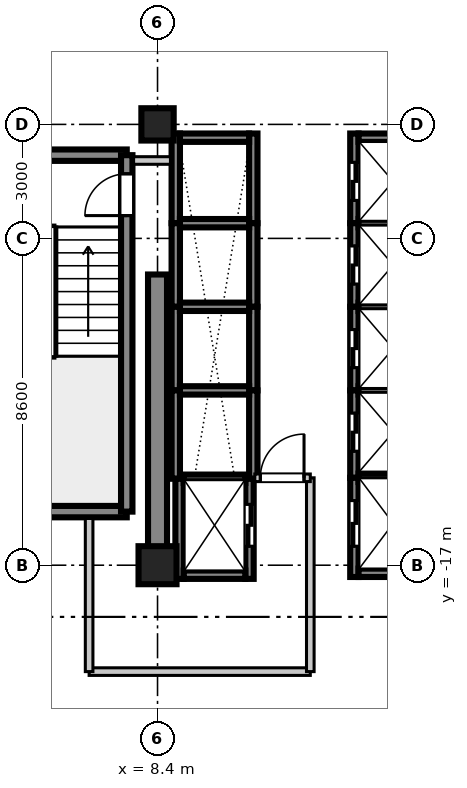
"""IFC4 building model, lengths in metres.
Left out: names, types, materials, properties, quantities, classifications, styles, units other than length and angle.
Written with IfcOpenShell. Run it as: python <this file> out.ifc"""

import sys

from ifc_helpers import new_model, si_unit, direction, frame, frame_2d, origin, origin_2d, place, context, subcontext, project, spatial, rectangle, extrude, source, transform, mapped, element, fill, save


model = new_model("IFC4")
c1 = context("Model", 3, precision=1e-05, world=origin(), true_north=direction((0.0, 1.0)))
c2 = subcontext(c1, "Body", "Model", "MODEL_VIEW")
j1 = project(units=[si_unit("LENGTHUNIT", "METRE"), si_unit("PLANEANGLEUNIT", "RADIAN")], contexts=[c1])
p1 = place(None, origin())
s1 = spatial("IfcSite", under=j1, at=p1, CompositionType="ELEMENT")
p2 = place(p1, origin())
s2 = spatial("IfcBuilding", under=s1, at=p2, CompositionType="ELEMENT")
p3 = place(p2, frame((0.0, 0.0, 219.7)))
s3 = spatial("IfcBuildingStorey", under=s2, at=p3, CompositionType="ELEMENT", Elevation=219.7)
m1 = source(origin(), c2, "Body", "SweptSolid", [
    extrude(rectangle(XDim=1.0, YDim=1.0, at=origin_2d()), origin(), (0.0, 0.0, 1.0), 3.655),
])
p4 = place(p3, frame((8.4, -17.0, 0.0), z_axis=(0.0, 0.0, 1.0), x_axis=(1.0, 0.0, 0.0)))
e1 = element("IfcColumn", 1, at=p4, inside=s3, PredefinedType="COLUMN", context=c2, shape_type="MappedRepresentation", body=[
    mapped(m1, transform((0.0, 0.0, 0.0), scale=1.0)),
])
m2 = source(origin(), c2, "Body", "SweptSolid", [
    extrude(rectangle(XDim=0.85, YDim=0.85, at=origin_2d()), origin(), (0.0, 0.0, 1.0), 3.655),
])
p5 = place(p3, frame((8.4, -5.4, 0.0), z_axis=(0.0, 0.0, 1.0), x_axis=(1.0, 0.0, 0.0)))
e2 = element("IfcColumn", 2, at=p5, inside=s3, PredefinedType="PILASTER", context=c2, shape_type="MappedRepresentation", body=[
    mapped(m2, transform((0.0, 0.0, 0.0), scale=1.0)),
])
m3 = source(origin(), c2, "Body", "SweptSolid", [
    extrude(rectangle(XDim=7.65, YDim=0.5, at=frame_2d((3.825, 0.0))), origin(), (0.0, 0.0, 1.0), 3.41),
])
p6 = place(p3, frame((8.4, -17.0, 0.0), z_axis=(0.0, 0.0, 1.0), x_axis=(0.0, 1.0, 0.0)))
e3 = element("IfcWall", 3, at=p6, inside=s3, PredefinedType="SHEAR", context=c2, shape_type="MappedRepresentation", body=[
    mapped(m3, transform((0.0, 0.0, 0.0), scale=1.0)),
])
m4 = source(origin(), c2, "Body", "SweptSolid", [
    extrude(rectangle(XDim=3.98, YDim=0.3, at=frame_2d((1.99, 0.0))), origin(), (0.0, 0.0, 1.0), 3.41),
])
for number, where, z_axis, x_axis in (
    (4, (3.61, -15.59, 0.0), (0.0, 0.0, 1.0), (1.0, 0.0, 0.0)),
    (5, (3.61, -6.21, 0.0), (0.0, 0.0, 1.0), (1.0, 0.0, 0.0)),
):
    element("IfcWall", number, at=place(p3, frame(where, z_axis=z_axis, x_axis=x_axis)), inside=s3, PredefinedType="SHEAR", context=c2, shape_type="MappedRepresentation", body=[
        mapped(m4, transform((0.0, 0.0, 0.0), scale=1.0)),
    ])
m5 = source(origin(), c2, "Body", "SweptSolid", [
    extrude(rectangle(XDim=9.38, YDim=0.3, at=frame_2d((4.69, 0.0))), origin(), (0.0, 0.0, 1.0), 3.41),
])
p7 = place(p3, frame((7.59, -15.59, 0.0), z_axis=(0.0, 0.0, 1.0), x_axis=(0.0, 1.0, 0.0)))
e6 = element("IfcWall", 6, at=p7, inside=s3, PredefinedType="SHEAR", context=c2, shape_type="MappedRepresentation", body=[
    mapped(m5, transform((0.0, 0.0, 0.0), scale=1.0)),
])
p8 = place(p7, frame((7.79, 0.0, 0.0)))
e7 = element("IfcOpeningElement", 7, at=p8, cuts=e6, PredefinedType="OPENING", context=c2, shape_type="SweptSolid", body=[
    extrude(rectangle(XDim=1.1, YDim=2.15, at=frame_2d((0.55, 1.075))), frame((0.0, 0.16, 0.0), z_axis=(0.0, -1.0, 0.0), x_axis=(1.0, 0.0, 0.0)), (0.0, 0.0, 1.0), 0.32),
])
m6 = source(origin(), c2, "Body", "SweptSolid", [
    extrude(rectangle(XDim=2.36, YDim=0.22, at=frame_2d((1.18, 0.0))), origin(), (0.0, 0.0, 1.0), 3.41),
])
p9 = place(p3, frame((13.58, -8.0, 0.0), z_axis=(0.0, 0.0, 1.0), x_axis=(0.0, 1.0, 0.0)))
e8 = element("IfcWall", 8, at=p9, inside=s3, PredefinedType="SHEAR", context=c2, shape_type="MappedRepresentation", body=[
    mapped(m6, transform((0.0, 0.0, 0.0), scale=1.0)),
])
p10 = place(p9, frame((0.6, 0.0, 0.0)))
e9 = element("IfcOpeningElement", 9, at=p10, cuts=e8, PredefinedType="OPENING", context=c2, shape_type="SweptSolid", body=[
    extrude(rectangle(XDim=1.0, YDim=2.2, at=frame_2d((0.5, 1.1))), frame((0.0, 0.12, 0.0), z_axis=(0.0, -1.0, 0.0), x_axis=(1.0, 0.0, 0.0)), (0.0, 0.0, 1.0), 0.24),
])
m7 = source(origin(), c2, "Body", "SweptSolid", [
    extrude(rectangle(XDim=1.82, YDim=0.22, at=frame_2d((0.91, 0.0))), origin(), (0.0, 0.0, 1.0), 3.41),
])
p11 = place(p3, frame((13.69, -5.75, 0.0), z_axis=(0.0, 0.0, 1.0), x_axis=(1.0, 0.0, 0.0)))
e10 = element("IfcWall", 10, at=p11, inside=s3, PredefinedType="SHEAR", context=c2, shape_type="MappedRepresentation", body=[
    mapped(m7, transform((0.0, 0.0, 0.0), scale=1.0)),
])
m8 = source(origin(), c2, "Body", "SweptSolid", [
    extrude(rectangle(XDim=2.2, YDim=0.22, at=frame_2d((1.1, 0.0))), origin(), (0.0, 0.0, 1.0), 3.41),
])
p12 = place(p3, frame((13.58, -10.2, 0.0), z_axis=(0.0, 0.0, 1.0), x_axis=(0.0, 1.0, 0.0)))
e11 = element("IfcWall", 11, at=p12, inside=s3, PredefinedType="SHEAR", context=c2, shape_type="MappedRepresentation", body=[
    mapped(m8, transform((0.0, 0.0, 0.0), scale=1.0)),
])
p13 = place(p12, frame((0.6, 0.0, 0.0)))
e12 = element("IfcOpeningElement", 12, at=p13, cuts=e11, PredefinedType="OPENING", context=c2, shape_type="SweptSolid", body=[
    extrude(rectangle(XDim=1.0, YDim=2.2, at=frame_2d((0.5, 1.1))), frame((0.0, 0.12, 0.0), z_axis=(0.0, -1.0, 0.0), x_axis=(1.0, 0.0, 0.0)), (0.0, 0.0, 1.0), 0.24),
])
m9 = source(origin(), c2, "Body", "SweptSolid", [
    extrude(rectangle(XDim=1.82, YDim=0.22, at=frame_2d((0.91, 0.0))), origin(), (0.0, 0.0, 1.0), 3.7),
])
p14 = place(p3, frame((13.69, -8.0, 0.0), z_axis=(0.0, 0.0, 1.0), x_axis=(1.0, 0.0, 0.0)))
e13 = element("IfcWall", 13, at=p14, inside=s3, PredefinedType="SHEAR", context=c2, shape_type="MappedRepresentation", body=[
    mapped(m9, transform((0.0, 0.0, 0.0), scale=1.0)),
])
p15 = place(p3, frame((13.58, -12.4, 0.0), z_axis=(0.0, 0.0, 1.0), x_axis=(0.0, 1.0, 0.0)))
e14 = element("IfcWall", 14, at=p15, inside=s3, PredefinedType="SHEAR", context=c2, shape_type="MappedRepresentation", body=[
    mapped(m8, transform((0.0, 0.0, 0.0), scale=1.0)),
])
p16 = place(p15, frame((0.6, 0.0, 0.0)))
e15 = element("IfcOpeningElement", 15, at=p16, cuts=e14, PredefinedType="OPENING", context=c2, shape_type="SweptSolid", body=[
    extrude(rectangle(XDim=1.0, YDim=2.2, at=frame_2d((0.5, 1.1))), frame((0.0, 0.12, 0.0), z_axis=(0.0, -1.0, 0.0), x_axis=(1.0, 0.0, 0.0)), (0.0, 0.0, 1.0), 0.24),
])
p17 = place(p3, frame((13.69, -10.2, 0.0), z_axis=(0.0, 0.0, 1.0), x_axis=(1.0, 0.0, 0.0)))
e16 = element("IfcWall", 16, at=p17, inside=s3, PredefinedType="SHEAR", context=c2, shape_type="MappedRepresentation", body=[
    mapped(m9, transform((0.0, 0.0, 0.0), scale=1.0)),
])
m10 = source(origin(), c2, "Body", "SweptSolid", [
    extrude(rectangle(XDim=2.3, YDim=0.22, at=frame_2d((1.15, 0.0))), origin(), (0.0, 0.0, 1.0), 3.41),
])
p18 = place(p3, frame((13.58, -14.7, 0.0), z_axis=(0.0, 0.0, 1.0), x_axis=(0.0, 1.0, 0.0)))
e17 = element("IfcWall", 17, at=p18, inside=s3, PredefinedType="SHEAR", context=c2, shape_type="MappedRepresentation", body=[
    mapped(m10, transform((0.0, 0.0, 0.0), scale=1.0)),
])
p19 = place(p18, frame((0.7, 0.0, 0.0)))
e18 = element("IfcOpeningElement", 18, at=p19, cuts=e17, PredefinedType="OPENING", context=c2, shape_type="SweptSolid", body=[
    extrude(rectangle(XDim=1.0, YDim=2.2, at=frame_2d((0.5, 1.1))), frame((0.0, 0.12, 0.0), z_axis=(0.0, -1.0, 0.0), x_axis=(1.0, 0.0, 0.0)), (0.0, 0.0, 1.0), 0.24),
])
p20 = place(p3, frame((13.69, -12.4, 0.0), z_axis=(0.0, 0.0, 1.0), x_axis=(1.0, 0.0, 0.0)))
e19 = element("IfcWall", 19, at=p20, inside=s3, PredefinedType="SHEAR", context=c2, shape_type="MappedRepresentation", body=[
    mapped(m9, transform((0.0, 0.0, 0.0), scale=1.0)),
])
for number, where, z_axis, x_axis in (
    (20, (8.88, -8.0, 0.0), (0.0, 0.0, 1.0), (0.0, 1.0, 0.0)),
    (21, (10.92, -8.0, 0.0), (0.0, 0.0, 1.0), (0.0, 1.0, 0.0)),
):
    element("IfcWall", number, at=place(p3, frame(where, z_axis=z_axis, x_axis=x_axis)), inside=s3, PredefinedType="SHEAR", context=c2, shape_type="MappedRepresentation", body=[
        mapped(m6, transform((0.0, 0.0, 0.0), scale=1.0)),
    ])
p21 = place(p3, frame((8.99, -5.75, 0.0), z_axis=(0.0, 0.0, 1.0), x_axis=(1.0, 0.0, 0.0)))
e22 = element("IfcWall", 22, at=p21, inside=s3, PredefinedType="SHEAR", context=c2, shape_type="MappedRepresentation", body=[
    mapped(m7, transform((0.0, 0.0, 0.0), scale=1.0)),
])
for number, where, z_axis, x_axis in (
    (23, (8.88, -10.2, 0.0), (0.0, 0.0, 1.0), (0.0, 1.0, 0.0)),
    (24, (10.92, -10.2, 0.0), (0.0, 0.0, 1.0), (0.0, 1.0, 0.0)),
):
    element("IfcWall", number, at=place(p3, frame(where, z_axis=z_axis, x_axis=x_axis)), inside=s3, PredefinedType="SHEAR", context=c2, shape_type="MappedRepresentation", body=[
        mapped(m8, transform((0.0, 0.0, 0.0), scale=1.0)),
    ])
p22 = place(p3, frame((8.99, -8.0, 0.0), z_axis=(0.0, 0.0, 1.0), x_axis=(1.0, 0.0, 0.0)))
e25 = element("IfcWall", 25, at=p22, inside=s3, PredefinedType="SHEAR", context=c2, shape_type="MappedRepresentation", body=[
    mapped(m9, transform((0.0, 0.0, 0.0), scale=1.0)),
])
for number, where, z_axis, x_axis in (
    (26, (8.88, -12.4, 0.0), (0.0, 0.0, 1.0), (0.0, 1.0, 0.0)),
    (27, (10.92, -12.4, 0.0), (0.0, 0.0, 1.0), (0.0, 1.0, 0.0)),
):
    element("IfcWall", number, at=place(p3, frame(where, z_axis=z_axis, x_axis=x_axis)), inside=s3, PredefinedType="SHEAR", context=c2, shape_type="MappedRepresentation", body=[
        mapped(m8, transform((0.0, 0.0, 0.0), scale=1.0)),
    ])
p23 = place(p3, frame((8.99, -10.2, 0.0), z_axis=(0.0, 0.0, 1.0), x_axis=(1.0, 0.0, 0.0)))
e28 = element("IfcWall", 28, at=p23, inside=s3, PredefinedType="SHEAR", context=c2, shape_type="MappedRepresentation", body=[
    mapped(m9, transform((0.0, 0.0, 0.0), scale=1.0)),
])
m11 = source(origin(), c2, "Body", "SweptSolid", [
    extrude(rectangle(XDim=2.325, YDim=0.22, at=frame_2d((1.163, 0.0))), origin(), (0.0, 0.0, 1.0), 3.41),
])
for number, where, z_axis, x_axis in (
    (29, (8.88, -14.725, 0.0), (0.0, 0.0, 1.0), (0.0, 1.0, 0.0)),
    (30, (10.92, -14.725, 0.0), (0.0, 0.0, 1.0), (0.0, 1.0, 0.0)),
):
    element("IfcWall", number, at=place(p3, frame(where, z_axis=z_axis, x_axis=x_axis)), inside=s3, PredefinedType="SHEAR", context=c2, shape_type="MappedRepresentation", body=[
        mapped(m11, transform((0.0, 0.0, 0.0), scale=1.0)),
    ])
p24 = place(p3, frame((8.99, -12.4, 0.0), z_axis=(0.0, 0.0, 1.0), x_axis=(1.0, 0.0, 0.0)))
e31 = element("IfcWall", 31, at=p24, inside=s3, PredefinedType="SHEAR", context=c2, shape_type="MappedRepresentation", body=[
    mapped(m9, transform((0.0, 0.0, 0.0), scale=1.0)),
])
m12 = source(origin(), c2, "Body", "SweptSolid", [
    extrude(rectangle(XDim=2.635, YDim=0.22, at=frame_2d((1.317, 0.0))), origin(), (0.0, 0.0, 1.0), 3.41),
])
p25 = place(p3, frame((8.98, -17.36, 0.0), z_axis=(0.0, 0.0, 1.0), x_axis=(0.0, 1.0, 0.0)))
e32 = element("IfcWall", 32, at=p25, inside=s3, PredefinedType="SHEAR", context=c2, shape_type="MappedRepresentation", body=[
    mapped(m12, transform((0.0, 0.0, 0.0), scale=1.0)),
])
p26 = place(p3, frame((10.82, -17.36, 0.0), z_axis=(0.0, 0.0, 1.0), x_axis=(0.0, 1.0, 0.0)))
e33 = element("IfcWall", 33, at=p26, inside=s3, PredefinedType="SHEAR", context=c2, shape_type="MappedRepresentation", body=[
    mapped(m12, transform((0.0, 0.0, 0.0), scale=1.0)),
])
p27 = place(p26, frame((0.86, 0.0, 0.0)))
e34 = element("IfcOpeningElement", 34, at=p27, cuts=e33, PredefinedType="OPENING", context=c2, shape_type="SweptSolid", body=[
    extrude(rectangle(XDim=1.1, YDim=2.2, at=frame_2d((0.55, 1.1))), frame((0.0, 0.12, 0.0), z_axis=(0.0, -1.0, 0.0), x_axis=(1.0, 0.0, 0.0)), (0.0, 0.0, 1.0), 0.24),
])
m13 = source(origin(), c2, "Body", "SweptSolid", [
    extrude(rectangle(XDim=1.62, YDim=0.22, at=frame_2d((0.81, 0.0))), origin(), (0.0, 0.0, 1.0), 3.41),
])
p28 = place(p3, frame((9.09, -17.25, 0.0), z_axis=(0.0, 0.0, 1.0), x_axis=(1.0, 0.0, 0.0)))
e35 = element("IfcWall", 35, at=p28, inside=s3, PredefinedType="SHEAR", context=c2, shape_type="MappedRepresentation", body=[
    mapped(m13, transform((0.0, 0.0, 0.0), scale=1.0)),
])
m14 = source(origin(), c2, "Body", "SweptSolid", [
    extrude(rectangle(XDim=1.62, YDim=0.22, at=frame_2d((0.81, 0.0))), origin(), (0.0, 0.0, 1.0), 3.7),
])
p29 = place(p3, frame((9.09, -14.725, 0.0), z_axis=(0.0, 0.0, 1.0), x_axis=(1.0, 0.0, 0.0)))
e36 = element("IfcWall", 36, at=p29, inside=s3, PredefinedType="SHEAR", context=c2, shape_type="MappedRepresentation", body=[
    mapped(m14, transform((0.0, 0.0, 0.0), scale=1.0)),
])
m15 = source(origin(), c2, "Body", "SweptSolid", [
    extrude(rectangle(XDim=2.61, YDim=0.22, at=frame_2d((1.305, 0.0))), origin(), (0.0, 0.0, 1.0), 3.41),
])
p30 = place(p3, frame((13.58, -17.31, 0.0), z_axis=(0.0, 0.0, 1.0), x_axis=(0.0, 1.0, 0.0)))
e37 = element("IfcWall", 37, at=p30, inside=s3, PredefinedType="SHEAR", context=c2, shape_type="MappedRepresentation", body=[
    mapped(m15, transform((0.0, 0.0, 0.0), scale=1.0)),
])
p31 = place(p30, frame((0.81, 0.0, 0.0)))
e38 = element("IfcOpeningElement", 38, at=p31, cuts=e37, PredefinedType="OPENING", context=c2, shape_type="SweptSolid", body=[
    extrude(rectangle(XDim=1.2, YDim=2.2, at=frame_2d((0.6, 1.1))), frame((0.0, 0.12, 0.0), z_axis=(0.0, -1.0, 0.0), x_axis=(1.0, 0.0, 0.0)), (0.0, 0.0, 1.0), 0.24),
])
p32 = place(p3, frame((13.69, -17.2, 0.0), z_axis=(0.0, 0.0, 1.0), x_axis=(1.0, 0.0, 0.0)))
e39 = element("IfcWall", 39, at=p32, inside=s3, PredefinedType="SHEAR", context=c2, shape_type="MappedRepresentation", body=[
    mapped(m7, transform((0.0, 0.0, 0.0), scale=1.0)),
])
p33 = place(p3, frame((13.69, -14.7, 0.0), z_axis=(0.0, 0.0, 1.0), x_axis=(1.0, 0.0, 0.0)))
e40 = element("IfcWall", 40, at=p33, inside=s3, PredefinedType="SHEAR", context=c2, shape_type="MappedRepresentation", body=[
    mapped(m9, transform((0.0, 0.0, 0.0), scale=1.0)),
])
m16 = source(origin(), c2, "Body", "SweptSolid", [
    extrude(rectangle(XDim=5.82, YDim=0.2, at=frame_2d((2.91, 0.0))), origin(), (0.0, 0.0, 1.0), 2.75),
])
p34 = place(p3, frame((6.6, -19.8, 0.0), z_axis=(0.0, 0.0, 1.0), x_axis=(1.0, 0.0, 0.0)))
e41 = element("IfcWall", 41, at=p34, inside=s3, PredefinedType="PARTITIONING", context=c2, shape_type="MappedRepresentation", body=[
    mapped(m16, transform((0.0, 0.0, 0.0), scale=1.0)),
])
m17 = source(origin(), c2, "Body", "SweptSolid", [
    extrude(rectangle(XDim=4.03, YDim=0.2, at=frame_2d((2.015, 0.0))), origin(), (0.0, 0.0, 1.0), 2.75),
])
p35 = place(p3, frame((6.6, -19.8, 0.0), z_axis=(0.0, 0.0, 1.0), x_axis=(0.0, 1.0, 0.0)))
e42 = element("IfcWall", 42, at=p35, inside=s3, PredefinedType="PARTITIONING", context=c2, shape_type="MappedRepresentation", body=[
    mapped(m17, transform((0.0, 0.0, 0.0), scale=1.0)),
])
m18 = source(origin(), c2, "Body", "SweptSolid", [
    extrude(rectangle(XDim=5.1, YDim=0.2, at=frame_2d((2.55, 0.0))), origin(), (0.0, 0.0, 1.0), 2.75),
])
p36 = place(p3, frame((12.42, -19.8, 0.0), z_axis=(0.0, 0.0, 1.0), x_axis=(0.0, 1.0, 0.0)))
e43 = element("IfcWall", 43, at=p36, inside=s3, PredefinedType="PARTITIONING", context=c2, shape_type="MappedRepresentation", body=[
    mapped(m18, transform((0.0, 0.0, 0.0), scale=1.0)),
])
m19 = source(origin(), c2, "Body", "SweptSolid", [
    extrude(rectangle(XDim=1.46, YDim=0.2, at=frame_2d((0.73, 0.0))), origin(), (0.0, 0.0, 1.0), 2.75),
])
p37 = place(p3, frame((10.96, -14.7, 0.0), z_axis=(0.0, 0.0, 1.0), x_axis=(1.0, 0.0, 0.0)))
e44 = element("IfcWall", 44, at=p37, inside=s3, PredefinedType="PARTITIONING", context=c2, shape_type="MappedRepresentation", body=[
    mapped(m19, transform((0.0, 0.0, 0.0), scale=1.0)),
])
p38 = place(p37, frame((0.145, 0.0, 0.0)))
e45 = element("IfcOpeningElement", 45, at=p38, cuts=e44, PredefinedType="OPENING", context=c2, shape_type="SweptSolid", body=[
    extrude(rectangle(XDim=1.15, YDim=2.15, at=frame_2d((0.575, 1.075))), frame((0.0, 0.11, 0.0), z_axis=(0.0, -1.0, 0.0), x_axis=(1.0, 0.0, 0.0)), (0.0, 0.0, 1.0), 0.22),
])
m20 = source(origin(), c2, "Body", "SweptSolid", [
    extrude(rectangle(XDim=0.97, YDim=0.2, at=frame_2d((0.485, 0.0))), origin(), (0.0, 0.0, 1.0), 2.75),
])
p39 = place(p3, frame((7.77, -6.35, 0.0), z_axis=(0.0, 0.0, 1.0), x_axis=(1.0, 0.0, 0.0)))
e46 = element("IfcWall", 46, at=p39, inside=s3, PredefinedType="PARTITIONING", context=c2, shape_type="MappedRepresentation", body=[
    mapped(m20, transform((0.0, 0.0, 0.0), scale=1.0)),
])
m21 = source(origin(), c2, "Body", "SweptSolid", [
    extrude(rectangle(XDim=1.1, YDim=2.15, at=frame_2d((0.55, 1.075))), frame((0.0, 0.025, 0.0), z_axis=(0.0, -1.0, 0.0), x_axis=(1.0, 0.0, 0.0)), (0.0, 0.0, 1.0), 0.05),
])
p40 = place(p8, origin())
e47 = element("IfcDoor", 47, at=p40, inside=s3, OperationType="SINGLE_SWING_LEFT", PredefinedType="DOOR", context=c2, shape_type="MappedRepresentation", body=[
    mapped(m21, transform((0.0, 0.0, 0.0), scale=1.0)),
])
fill(e7, e47)
m22 = source(origin(), c2, "Body", "SweptSolid", [
    extrude(rectangle(XDim=1.0, YDim=2.2, at=frame_2d((0.5, 1.1))), frame((0.0, 0.025, 0.0), z_axis=(0.0, -1.0, 0.0), x_axis=(1.0, 0.0, 0.0)), (0.0, 0.0, 1.0), 0.05),
])
p41 = place(p10, origin())
e48 = element("IfcDoor", 48, at=p41, inside=s3, OperationType="DOUBLE_DOOR_SLIDING", PredefinedType="DOOR", context=c2, shape_type="MappedRepresentation", body=[
    mapped(m22, transform((0.0, 0.0, 0.0), scale=1.0)),
])
fill(e9, e48)
p42 = place(p13, origin())
e49 = element("IfcDoor", 49, at=p42, inside=s3, OperationType="DOUBLE_DOOR_SLIDING", PredefinedType="DOOR", context=c2, shape_type="MappedRepresentation", body=[
    mapped(m22, transform((0.0, 0.0, 0.0), scale=1.0)),
])
fill(e12, e49)
p43 = place(p16, origin())
e50 = element("IfcDoor", 50, at=p43, inside=s3, OperationType="DOUBLE_DOOR_SLIDING", PredefinedType="DOOR", context=c2, shape_type="MappedRepresentation", body=[
    mapped(m22, transform((0.0, 0.0, 0.0), scale=1.0)),
])
fill(e15, e50)
p44 = place(p19, origin())
e51 = element("IfcDoor", 51, at=p44, inside=s3, OperationType="DOUBLE_DOOR_SLIDING", PredefinedType="DOOR", context=c2, shape_type="MappedRepresentation", body=[
    mapped(m22, transform((0.0, 0.0, 0.0), scale=1.0)),
])
fill(e18, e51)
m23 = source(origin(), c2, "Body", "SweptSolid", [
    extrude(rectangle(XDim=1.1, YDim=2.2, at=frame_2d((0.55, 1.1))), frame((0.0, 0.025, 0.0), z_axis=(0.0, -1.0, 0.0), x_axis=(1.0, 0.0, 0.0)), (0.0, 0.0, 1.0), 0.05),
])
p45 = place(p27, frame((1.1, 0.0, 0.0), z_axis=(0.0, 0.0, 1.0), x_axis=(-1.0, 0.0, 0.0)))
e52 = element("IfcDoor", 52, at=p45, inside=s3, OperationType="DOUBLE_DOOR_SLIDING", PredefinedType="DOOR", context=c2, shape_type="MappedRepresentation", body=[
    mapped(m23, transform((0.0, 0.0, 0.0), scale=1.0)),
])
fill(e34, e52)
m24 = source(origin(), c2, "Body", "SweptSolid", [
    extrude(rectangle(XDim=1.2, YDim=2.2, at=frame_2d((0.6, 1.1))), frame((0.0, 0.025, 0.0), z_axis=(0.0, -1.0, 0.0), x_axis=(1.0, 0.0, 0.0)), (0.0, 0.0, 1.0), 0.05),
])
p46 = place(p31, origin())
e53 = element("IfcDoor", 53, at=p46, inside=s3, OperationType="DOUBLE_DOOR_SLIDING", PredefinedType="DOOR", context=c2, shape_type="MappedRepresentation", body=[
    mapped(m24, transform((0.0, 0.0, 0.0), scale=1.0)),
])
fill(e38, e53)
m25 = source(origin(), c2, "Body", "SweptSolid", [
    extrude(rectangle(XDim=1.15, YDim=2.15, at=frame_2d((0.575, 1.075))), frame((0.0, 0.025, 0.0), z_axis=(0.0, -1.0, 0.0), x_axis=(1.0, 0.0, 0.0)), (0.0, 0.0, 1.0), 0.05),
])
p47 = place(p38, origin())
e54 = element("IfcDoor", 54, at=p47, inside=s3, OperationType="SINGLE_SWING_RIGHT", PredefinedType="DOOR", context=c2, shape_type="MappedRepresentation", body=[
    mapped(m25, transform((0.0, 0.0, 0.0), scale=1.0)),
])
fill(e45, e54)
save(model, sys.argv[1])
